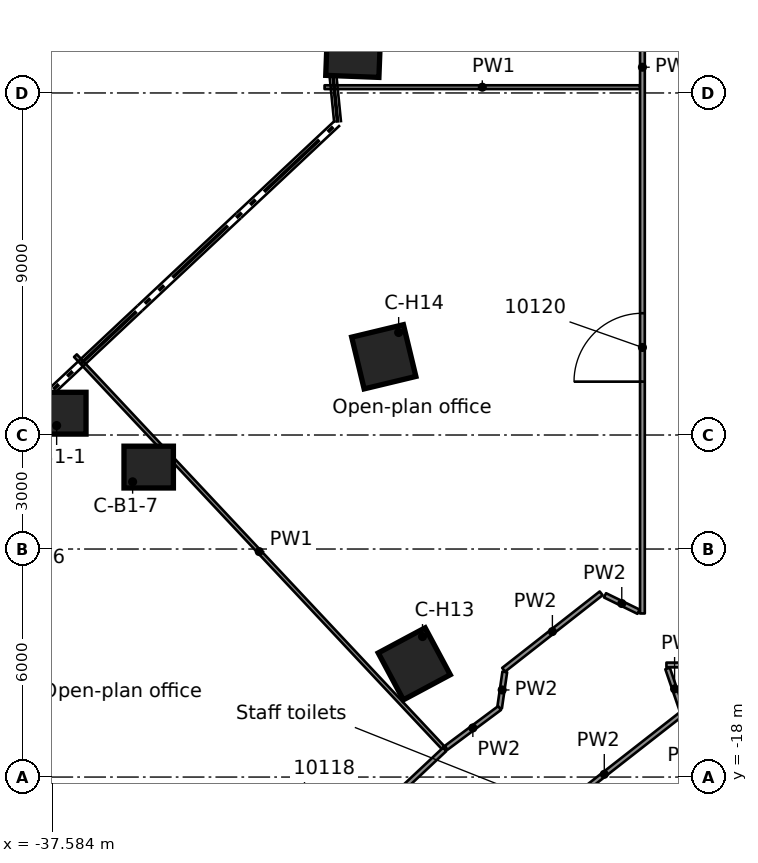
"""IFC4 building model, lengths in metres.
Left out: names, types, materials, properties, quantities, classifications, styles, units other than length and angle.
Written with IfcOpenShell. Run it as: python <this file> out.ifc"""

import sys

from ifc_helpers import new_model, si_unit, direction, frame, frame_2d, origin, origin_2d, place, context, subcontext, project, spatial, rectangle, extrude, element, fill, save


model = new_model("IFC4")
c1 = context("Model", 3, precision=1e-05, world=origin(), true_north=direction((0.0, 1.0)))
c2 = subcontext(c1, "Body", "Model", "MODEL_VIEW")
j1 = project(units=[si_unit("LENGTHUNIT", "METRE"), si_unit("PLANEANGLEUNIT", "RADIAN")], contexts=[c1])
p1 = place(None, origin())
s1 = spatial("IfcSite", under=j1, at=p1, CompositionType="ELEMENT")
p2 = place(p1, origin())
s2 = spatial("IfcBuilding", under=s1, at=p2, CompositionType="ELEMENT")
p3 = place(p2, frame((0.0, 0.0, 51.3)))
s3 = spatial("IfcBuildingStorey", under=s2, at=p3, CompositionType="ELEMENT", Elevation=51.3)
for number, where, z_axis, x_axis in (
    (1, (-37.341, -8.426, 0.0), (0.0, 0.0, 1.0), (1.0, 0.0, 0.0)),
    (2, (-35.042, -9.844, 0.0), (0.0, 0.0, 1.0), (1.0, 0.0, 0.0)),
):
    element("IfcColumn", number, at=place(p3, frame(where, z_axis=z_axis, x_axis=x_axis)), inside=s3, PredefinedType="COLUMN", context=c2, shape_type="SweptSolid", body=[
        extrude(rectangle(XDim=1.3, YDim=1.1, at=origin_2d()), origin(), (0.0, 0.0, 1.0), 3.5),
    ])
for number, where, z_axis, x_axis in (
    (3, (-28.054, -15.021, 0.0), (0.0, 0.0, 1.0), (-0.882, -0.472, 0.0)),
    (4, (-28.856, -6.942, 0.0), (0.0, 0.0, 1.0), (-0.972, -0.234, 0.0)),
    (5, (-29.657, 1.136, 0.0), (0.0, 0.0, 1.0), (-0.999, 0.038, 0.0)),
):
    element("IfcColumn", number, at=place(p3, frame(where, z_axis=z_axis, x_axis=x_axis)), inside=s3, PredefinedType="COLUMN", context=c2, shape_type="SweptSolid", body=[
        extrude(rectangle(XDim=1.4, YDim=1.4, at=origin_2d()), origin(), (0.0, 0.0, 1.0), 3.5),
    ])
p4 = place(p3, frame((-21.388, -15.143, 0.0), z_axis=(0.0, 0.0, 1.0), x_axis=(0.324857441557, -0.945762994976, 0.0)))
e6 = element("IfcWall", 6, at=p4, inside=s3, PredefinedType="PARTITIONING", context=c2, shape_type="SweptSolid", body=[
    extrude(rectangle(XDim=1.135, YDim=0.125, at=frame_2d((0.568, 0.0))), origin(), (0.0, 0.0, 1.0), 3.08),
])
p5 = place(p3, frame((-25.672, -15.233, 0.0), z_axis=(0.0, 0.0, 1.0), x_axis=(-0.142523859518, -0.989791366636, 0.0)))
e7 = element("IfcWall", 7, at=p5, inside=s3, PredefinedType="PARTITIONING", context=c2, shape_type="SweptSolid", body=[
    extrude(rectangle(XDim=0.961, YDim=0.125, at=frame_2d((0.48, 0.0))), origin(), (0.0, 0.0, 1.0), 3.08),
])
p6 = place(p3, frame((-44.487, -13.963, 0.0), z_axis=(0.0, 0.0, 1.0), x_axis=(0.684112301014, -0.729376692526, 0.0)))
e8 = element("IfcWall", 8, at=p6, inside=s3, PredefinedType="PARTITIONING", context=c2, shape_type="SweptSolid", body=[
    extrude(rectangle(XDim=14.137, YDim=0.1, at=frame_2d((7.068, 0.0))), origin(), (0.0, 0.0, 1.0), 3.08),
])
p7 = place(p3, frame((-36.97, -6.912, 0.0), z_axis=(0.0, 0.0, 1.0), x_axis=(0.684148478852, -0.729342758163, 0.0)))
e9 = element("IfcWall", 9, at=p7, inside=s3, PredefinedType="PARTITIONING", context=c2, shape_type="SweptSolid", body=[
    extrude(rectangle(XDim=14.137, YDim=0.1, at=frame_2d((7.069, 0.0))), origin(), (0.0, 0.0, 1.0), 3.08),
])
p8 = place(p3, frame((-23.034, -13.218, 0.0), z_axis=(0.0, 0.0, 1.0), x_axis=(0.898277364267, -0.439428921267, 0.0)))
e10 = element("IfcWall", 10, at=p8, inside=s3, PredefinedType="PARTITIONING", context=c2, shape_type="SweptSolid", body=[
    extrude(rectangle(XDim=0.981, YDim=0.125, at=frame_2d((0.49, 0.0))), origin(), (0.0, 0.0, 1.0), 3.08),
])
p9 = place(p3, frame((-21.418, -15.051, 0.0), z_axis=(0.0, 0.0, 1.0), x_axis=(1.0, 0.0, 0.0)))
e11 = element("IfcWall", 11, at=p9, inside=s3, PredefinedType="PARTITIONING", context=c2, shape_type="SweptSolid", body=[
    extrude(rectangle(XDim=2.293, YDim=0.125, at=frame_2d((1.146, 0.0))), origin(), (0.0, 0.0, 1.0), 3.08),
])
p10 = place(p3, frame((-30.414, 0.152, 0.0), z_axis=(0.0, 0.0, 1.0), x_axis=(1.0, 0.0, 0.0)))
e12 = element("IfcWall", 12, at=p10, inside=s3, PredefinedType="PARTITIONING", context=c2, shape_type="SweptSolid", body=[
    extrude(rectangle(XDim=8.301, YDim=0.1, at=frame_2d((4.15, 0.0))), origin(), (0.0, 0.0, 1.0), 3.08),
])
p11 = place(p3, frame((-25.809, -16.184, 0.0), z_axis=(0.0, 0.0, 1.0), x_axis=(-0.802084274436, -0.597210864522, 0.0)))
e13 = element("IfcWall", 13, at=p11, inside=s3, PredefinedType="PARTITIONING", context=c2, shape_type="SweptSolid", body=[
    extrude(rectangle(XDim=1.753, YDim=0.125, at=frame_2d((0.876, 0.0))), origin(), (0.0, 0.0, 1.0), 3.08),
])
p12 = place(p3, frame((-20.986, -16.311, 0.0), z_axis=(0.0, 0.0, 1.0), x_axis=(-0.787889650509, -0.615816448807, 0.0)))
e14 = element("IfcWall", 14, at=p12, inside=s3, PredefinedType="PARTITIONING", context=c2, shape_type="SweptSolid", body=[
    extrude(rectangle(XDim=5.248, YDim=0.125, at=frame_2d((2.624, 0.0))), origin(), (0.0, 0.0, 1.0), 3.08),
])
p13 = place(p3, frame((-23.136, -13.166, 0.0), z_axis=(0.0, 0.0, 1.0), x_axis=(-0.787076551365, -0.616855333358, 0.0)))
e15 = element("IfcWall", 15, at=p13, inside=s3, PredefinedType="PARTITIONING", context=c2, shape_type="SweptSolid", body=[
    extrude(rectangle(XDim=3.26, YDim=0.125, at=frame_2d((1.63, 0.0))), origin(), (0.0, 0.0, 1.0), 3.08),
])
p14 = place(p3, frame((-45.13, -34.035, 0.0), z_axis=(0.0, 0.0, 1.0), x_axis=(0.729450212829, 0.684033907788, 0.0)))
e16 = element("IfcWall", 16, at=p14, inside=s3, PredefinedType="PARTITIONING", context=c2, shape_type="SweptSolid", body=[
    extrude(rectangle(XDim=24.507, YDim=0.125, at=frame_2d((12.254, 0.0))), origin(), (0.0, 0.0, 1.0), 3.08),
])
p15 = place(p14, frame((18.55, 0.0, 0.0)))
e17 = element("IfcOpeningElement", 17, at=p15, cuts=e16, PredefinedType="OPENING", context=c2, shape_type="SweptSolid", body=[
    extrude(rectangle(XDim=1.8, YDim=2.1, at=frame_2d((0.9, 1.05))), frame((0.0, 0.073, 0.0), z_axis=(0.0, -1.0, 0.0), x_axis=(1.0, 0.0, 0.0)), (0.0, 0.0, 1.0), 0.145),
])
p16 = place(p14, frame((8.9, 0.0, 0.0)))
e18 = element("IfcOpeningElement", 18, at=p16, cuts=e16, PredefinedType="OPENING", context=c2, shape_type="SweptSolid", body=[
    extrude(rectangle(XDim=1.8, YDim=2.1, at=frame_2d((0.9, 1.05))), frame((0.0, 0.073, 0.0), z_axis=(0.0, -1.0, 0.0), x_axis=(1.0, 0.0, 0.0)), (0.0, 0.0, 1.0), 0.145),
])
p17 = place(p3, frame((-22.05, -13.696, 0.0), z_axis=(0.0, 0.0, 1.0), x_axis=(0.0, 1.0, 0.0)))
e19 = element("IfcWall", 19, at=p17, inside=s3, PredefinedType="PARTITIONING", context=c2, shape_type="SweptSolid", body=[
    extrude(rectangle(XDim=28.747, YDim=0.125, at=frame_2d((14.374, 0.0))), origin(), (0.0, 0.0, 1.0), 3.08),
])
p18 = place(p17, frame((6.1, 0.0, 0.0)))
e20 = element("IfcOpeningElement", 20, at=p18, cuts=e19, PredefinedType="OPENING", context=c2, shape_type="SweptSolid", body=[
    extrude(rectangle(XDim=1.8, YDim=2.1, at=frame_2d((0.9, 1.05))), frame((0.0, 0.073, 0.0), z_axis=(0.0, -1.0, 0.0), x_axis=(1.0, 0.0, 0.0)), (0.0, 0.0, 1.0), 0.145),
])
p19 = place(p17, frame((20.198, 0.0, 0.0)))
e21 = element("IfcOpeningElement", 21, at=p19, cuts=e19, PredefinedType="OPENING", context=c2, shape_type="SweptSolid", body=[
    extrude(rectangle(XDim=1.1, YDim=2.1, at=frame_2d((0.55, 1.05))), frame((0.0, 0.073, 0.0), z_axis=(0.0, -1.0, 0.0), x_axis=(1.0, 0.0, 0.0)), (0.0, 0.0, 1.0), 0.145),
])
p20 = place(p18, origin())
e22 = element("IfcDoor", 22, at=p20, inside=s3, OperationType="DOUBLE_DOOR_SINGLE_SWING", PredefinedType="DOOR", context=c2, shape_type="SweptSolid", body=[
    extrude(rectangle(XDim=1.8, YDim=2.1, at=frame_2d((0.9, 1.05))), frame((0.0, 0.025, 0.0), z_axis=(0.0, -1.0, 0.0), x_axis=(1.0, 0.0, 0.0)), (0.0, 0.0, 1.0), 0.05),
])
fill(e20, e22)
save(model, sys.argv[1])
